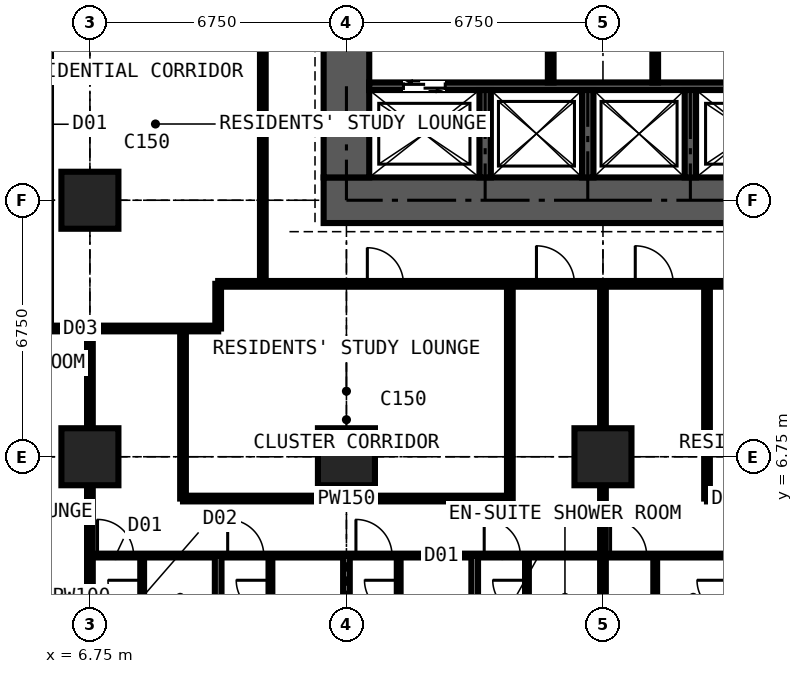
"""IFC4 building model, lengths in metres.
Left out: names, types, materials, properties, quantities, classifications, styles, units other than length and angle.
Written with IfcOpenShell. Run it as: python <this file> out.ifc"""

import sys

from ifc_helpers import new_model, si_unit, direction, frame, frame_2d, origin, origin_2d, place, context, subcontext, project, spatial, rectangle, extrude, element, fill, save


model = new_model("IFC4")
c1 = context("Model", 3, precision=1e-05, world=origin(), true_north=direction((0.0, 1.0)))
c2 = subcontext(c1, "Body", "Model", "MODEL_VIEW")
j1 = project(units=[si_unit("LENGTHUNIT", "METRE"), si_unit("PLANEANGLEUNIT", "RADIAN")], contexts=[c1])
p1 = place(None, origin())
s1 = spatial("IfcSite", under=j1, at=p1, CompositionType="ELEMENT")
p2 = place(p1, origin())
s2 = spatial("IfcBuilding", under=s1, at=p2, CompositionType="ELEMENT")
p3 = place(p2, frame((0.0, 0.0, 116.1)))
s3 = spatial("IfcBuildingStorey", under=s2, at=p3, CompositionType="ELEMENT", Elevation=116.1)
for number, where, z_axis, x_axis in (
    (1, (6.75, 6.75, 0.0), (0.0, 0.0, 1.0), (1.0, 0.0, 0.0)),
    (2, (6.75, 13.5, 0.0), (0.0, 0.0, 1.0), (1.0, 0.0, 0.0)),
    (3, (13.5, 6.75, 0.0), (0.0, 0.0, 1.0), (1.0, 0.0, 0.0)),
    (4, (20.25, 6.75, 0.0), (0.0, 0.0, 1.0), (1.0, 0.0, 0.0)),
):
    element("IfcColumn", number, at=place(p3, frame(where, z_axis=z_axis, x_axis=x_axis)), inside=s3, PredefinedType="COLUMN", context=c2, shape_type="SweptSolid", body=[
        extrude(rectangle(XDim=1.5, YDim=1.5, at=origin_2d()), origin(), (0.0, 0.0, 1.0), 3.6),
    ])
p4 = place(p3, frame((12.9, 13.5, 0.0), z_axis=(0.0, 0.0, 1.0), x_axis=(1.0, 0.0, 0.0)))
e5 = element("IfcWall", 5, at=p4, inside=s3, PredefinedType="SHEAR", context=c2, shape_type="SweptSolid", body=[
    extrude(rectangle(XDim=14.7, YDim=1.2, at=frame_2d((7.35, 0.0))), origin(), (0.0, 0.0, 1.0), 3.6),
])
p5 = place(p3, frame((13.5, 26.4, 0.0), z_axis=(0.0, 0.0, 1.0), x_axis=(0.0, -1.0, 0.0)))
e6 = element("IfcWall", 6, at=p5, inside=s3, PredefinedType="SHEAR", context=c2, shape_type="SweptSolid", body=[
    extrude(rectangle(XDim=12.3, YDim=1.2, at=frame_2d((6.15, 0.0))), origin(), (0.0, 0.0, 1.0), 3.6),
])
p6 = place(p5, frame((7.45, 0.0, 0.0)))
e7 = element("IfcOpeningElement", 7, at=p6, cuts=e6, PredefinedType="OPENING", context=c2, shape_type="SweptSolid", body=[
    extrude(rectangle(XDim=1.2, YDim=2.2, at=frame_2d((0.6, 1.1))), frame((0.0, 0.61, 0.0), z_axis=(0.0, -1.0, 0.0), x_axis=(1.0, 0.0, 0.0)), (0.0, 0.0, 1.0), 1.22),
])
p7 = place(p3, frame((14.1, 16.5, 0.0), z_axis=(0.0, 0.0, 1.0), x_axis=(1.0, 0.0, 0.0)))
e8 = element("IfcWall", 8, at=p7, inside=s3, PredefinedType="SHEAR", context=c2, shape_type="SweptSolid", body=[
    extrude(rectangle(XDim=12.3, YDim=0.2, at=frame_2d((6.15, 0.0))), origin(), (0.0, 0.0, 1.0), 3.6),
])
p8 = place(p7, frame((0.9, 0.0, 0.0)))
e9 = element("IfcOpeningElement", 9, at=p8, cuts=e8, PredefinedType="OPENING", context=c2, shape_type="SweptSolid", body=[
    extrude(rectangle(XDim=1.1, YDim=2.2, at=frame_2d((0.55, 1.1))), frame((0.0, 0.11, 0.0), z_axis=(0.0, -1.0, 0.0), x_axis=(1.0, 0.0, 0.0)), (0.0, 0.0, 1.0), 0.22),
])
p9 = place(p7, frame((9.5, 0.0, 0.0)))
e10 = element("IfcOpeningElement", 10, at=p9, cuts=e8, PredefinedType="OPENING", context=c2, shape_type="SweptSolid", body=[
    extrude(rectangle(XDim=1.1, YDim=2.2, at=frame_2d((0.55, 1.1))), frame((0.0, 0.11, 0.0), z_axis=(0.0, -1.0, 0.0), x_axis=(1.0, 0.0, 0.0)), (0.0, 0.0, 1.0), 0.22),
])
for number, where, z_axis, x_axis in (
    (11, (17.15, 14.1, 0.0), (0.0, 0.0, 1.0), (0.0, 1.0, 0.0)),
    (12, (19.85, 14.1, 0.0), (0.0, 0.0, 1.0), (0.0, 1.0, 0.0)),
    (13, (22.55, 14.1, 0.0), (0.0, 0.0, 1.0), (0.0, 1.0, 0.0)),
):
    element("IfcWall", number, at=place(p3, frame(where, z_axis=z_axis, x_axis=x_axis)), inside=s3, PredefinedType="SHEAR", context=c2, shape_type="SweptSolid", body=[
        extrude(rectangle(XDim=2.3, YDim=0.3, at=frame_2d((1.15, 0.0))), origin(), (0.0, 0.0, 1.0), 3.6),
    ])
p10 = place(p3, frame((18.875, 16.6, 0.0), z_axis=(0.0, 0.0, 1.0), x_axis=(0.0, 1.0, 0.0)))
e14 = element("IfcWall", 14, at=p10, inside=s3, PredefinedType="PARTITIONING", context=c2, shape_type="SweptSolid", body=[
    extrude(rectangle(XDim=3.5, YDim=0.15, at=frame_2d((1.75, 0.0))), origin(), (0.0, 0.0, 1.0), 3.375),
])
p11 = place(p10, frame((1.15, 0.0, 0.0)))
e15 = element("IfcOpeningElement", 15, at=p11, cuts=e14, PredefinedType="OPENING", context=c2, shape_type="SweptSolid", body=[
    extrude(rectangle(XDim=1.2, YDim=2.2, at=frame_2d((0.6, 1.1))), frame((0.0, 0.085, 0.0), z_axis=(0.0, -1.0, 0.0), x_axis=(1.0, 0.0, 0.0)), (0.0, 0.0, 1.0), 0.17),
])
p12 = place(p3, frame((21.625, 16.6, 0.0), z_axis=(0.0, 0.0, 1.0), x_axis=(0.0, 1.0, 0.0)))
e16 = element("IfcWall", 16, at=p12, inside=s3, PredefinedType="PARTITIONING", context=c2, shape_type="SweptSolid", body=[
    extrude(rectangle(XDim=3.5, YDim=0.15, at=frame_2d((1.75, 0.0))), origin(), (0.0, 0.0, 1.0), 3.375),
])
p13 = place(p12, frame((1.15, 0.0, 0.0)))
e17 = element("IfcOpeningElement", 17, at=p13, cuts=e16, PredefinedType="OPENING", context=c2, shape_type="SweptSolid", body=[
    extrude(rectangle(XDim=1.2, YDim=2.2, at=frame_2d((0.6, 1.1))), frame((0.0, 0.085, 0.0), z_axis=(0.0, -1.0, 0.0), x_axis=(1.0, 0.0, 0.0)), (0.0, 0.0, 1.0), 0.17),
])
p14 = place(p3, frame((-0.734, 10.125, 0.0), z_axis=(0.0, 0.0, 1.0), x_axis=(1.0, 0.0, 0.0)))
e18 = element("IfcWall", 18, at=p14, inside=s3, PredefinedType="PARTITIONING", context=c2, shape_type="SweptSolid", body=[
    extrude(rectangle(XDim=10.859, YDim=0.15, at=frame_2d((5.429, 0.0))), origin(), (0.0, 0.0, 1.0), 3.375),
])
p15 = place(p14, frame((5.134, 0.0, 0.0)))
e19 = element("IfcOpeningElement", 19, at=p15, cuts=e18, PredefinedType="OPENING", context=c2, shape_type="SweptSolid", body=[
    extrude(rectangle(XDim=1.0, YDim=2.2, at=frame_2d((0.5, 1.1))), frame((0.0, 0.085, 0.0), z_axis=(0.0, -1.0, 0.0), x_axis=(1.0, 0.0, 0.0)), (0.0, 0.0, 1.0), 0.17),
])
p16 = place(p3, frame((6.75, -0.734, 0.0), z_axis=(0.0, 0.0, 1.0), x_axis=(0.0, 1.0, 0.0)))
e20 = element("IfcWall", 20, at=p16, inside=s3, PredefinedType="PARTITIONING", context=c2, shape_type="SweptSolid", body=[
    extrude(rectangle(XDim=10.859, YDim=0.15, at=frame_2d((5.429, 0.0))), origin(), (0.0, 0.0, 1.0), 2.877),
])
p17 = place(p3, frame((6.75, 4.15, 0.0), z_axis=(0.0, 0.0, 1.0), x_axis=(1.0, 0.0, 0.0)))
e21 = element("IfcWall", 21, at=p17, inside=s3, PredefinedType="PARTITIONING", context=c2, shape_type="SweptSolid", body=[
    extrude(rectangle(XDim=23.625, YDim=0.1, at=frame_2d((11.812, 0.0))), origin(), (0.0, 0.0, 1.0), 3.375),
])
p18 = place(p17, frame((0.2, 0.0, 0.0)))
e22 = element("IfcOpeningElement", 22, at=p18, cuts=e21, PredefinedType="OPENING", context=c2, shape_type="SweptSolid", body=[
    extrude(rectangle(XDim=0.95, YDim=2.2, at=frame_2d((0.475, 1.1))), frame((0.0, 0.06, 0.0), z_axis=(0.0, -1.0, 0.0), x_axis=(1.0, 0.0, 0.0)), (0.0, 0.0, 1.0), 0.12),
])
p19 = place(p17, frame((3.625, 0.0, 0.0)))
e23 = element("IfcOpeningElement", 23, at=p19, cuts=e21, PredefinedType="OPENING", context=c2, shape_type="SweptSolid", body=[
    extrude(rectangle(XDim=0.95, YDim=2.2, at=frame_2d((0.475, 1.1))), frame((0.0, 0.06, 0.0), z_axis=(0.0, -1.0, 0.0), x_axis=(1.0, 0.0, 0.0)), (0.0, 0.0, 1.0), 0.12),
])
p20 = place(p17, frame((7.0, 0.0, 0.0)))
e24 = element("IfcOpeningElement", 24, at=p20, cuts=e21, PredefinedType="OPENING", context=c2, shape_type="SweptSolid", body=[
    extrude(rectangle(XDim=0.95, YDim=2.2, at=frame_2d((0.475, 1.1))), frame((0.0, 0.06, 0.0), z_axis=(0.0, -1.0, 0.0), x_axis=(1.0, 0.0, 0.0)), (0.0, 0.0, 1.0), 0.12),
])
p21 = place(p17, frame((10.375, 0.0, 0.0)))
e25 = element("IfcOpeningElement", 25, at=p21, cuts=e21, PredefinedType="OPENING", context=c2, shape_type="SweptSolid", body=[
    extrude(rectangle(XDim=0.95, YDim=2.2, at=frame_2d((0.475, 1.1))), frame((0.0, 0.06, 0.0), z_axis=(0.0, -1.0, 0.0), x_axis=(1.0, 0.0, 0.0)), (0.0, 0.0, 1.0), 0.12),
])
p22 = place(p17, frame((18.475, 0.0, 0.0)))
e26 = element("IfcOpeningElement", 26, at=p22, cuts=e21, PredefinedType="OPENING", context=c2, shape_type="SweptSolid", body=[
    extrude(rectangle(XDim=0.95, YDim=2.2, at=frame_2d((0.475, 1.1))), frame((0.0, 0.06, 0.0), z_axis=(0.0, -1.0, 0.0), x_axis=(1.0, 0.0, 0.0)), (0.0, 0.0, 1.0), 0.12),
])
p23 = place(p17, frame((13.7, 0.0, 0.0)))
e27 = element("IfcOpeningElement", 27, at=p23, cuts=e21, PredefinedType="OPENING", context=c2, shape_type="SweptSolid", body=[
    extrude(rectangle(XDim=0.95, YDim=2.2, at=frame_2d((0.475, 1.1))), frame((0.0, 0.06, 0.0), z_axis=(0.0, -1.0, 0.0), x_axis=(1.0, 0.0, 0.0)), (0.0, 0.0, 1.0), 0.12),
])
p24 = place(p3, frame((8.125, 1.95, 0.0), z_axis=(0.0, 0.0, 1.0), x_axis=(0.0, 1.0, 0.0)))
e28 = element("IfcWall", 28, at=p24, inside=s3, PredefinedType="PARTITIONING", context=c2, shape_type="SweptSolid", body=[
    extrude(rectangle(XDim=2.2, YDim=0.1, at=frame_2d((1.1, 0.0))), origin(), (0.0, 0.0, 1.0), 3.375),
])
p25 = place(p24, frame((0.65, 0.0, 0.0)))
e29 = element("IfcOpeningElement", 29, at=p25, cuts=e28, PredefinedType="OPENING", context=c2, shape_type="SweptSolid", body=[
    extrude(rectangle(XDim=0.9, YDim=2.2, at=frame_2d((0.45, 1.1))), frame((0.0, 0.06, 0.0), z_axis=(0.0, -1.0, 0.0), x_axis=(1.0, 0.0, 0.0)), (0.0, 0.0, 1.0), 0.12),
])
p26 = place(p3, frame((9.2, 5.65, 0.0), z_axis=(0.0, 0.0, 1.0), x_axis=(0.0, 1.0, 0.0)))
e30 = element("IfcWall", 30, at=p26, inside=s3, PredefinedType="PARTITIONING", context=c2, shape_type="SweptSolid", body=[
    extrude(rectangle(XDim=4.475, YDim=0.15, at=frame_2d((2.238, 0.0))), origin(), (0.0, 0.0, 1.0), 3.375),
])
p27 = place(p3, frame((9.2, 5.65, 0.0), z_axis=(0.0, 0.0, 1.0), x_axis=(1.0, 0.0, 0.0)))
e31 = element("IfcWall", 31, at=p27, inside=s3, PredefinedType="PARTITIONING", context=c2, shape_type="SweptSolid", body=[
    extrude(rectangle(XDim=8.6, YDim=0.15, at=frame_2d((4.3, 0.0))), origin(), (0.0, 0.0, 1.0), 3.375),
])
p28 = place(p3, frame((10.125, -0.734, 0.0), z_axis=(0.0, 0.0, 1.0), x_axis=(0.0, 1.0, 0.0)))
e32 = element("IfcWall", 32, at=p28, inside=s3, PredefinedType="PARTITIONING", context=c2, shape_type="SweptSolid", body=[
    extrude(rectangle(XDim=4.884, YDim=0.175, at=frame_2d((2.442, 0.0))), origin(), (0.0, 0.0, 1.0), 3.375),
])
p29 = place(p3, frame((10.125, 10.125, 0.0), z_axis=(0.0, 0.0, 1.0), x_axis=(0.0, 1.0, 0.0)))
e33 = element("IfcWall", 33, at=p29, inside=s3, PredefinedType="PARTITIONING", context=c2, shape_type="SweptSolid", body=[
    extrude(rectangle(XDim=1.175, YDim=0.15, at=frame_2d((0.587, 0.0))), origin(), (0.0, 0.0, 1.0), 3.375),
])
p30 = place(p3, frame((10.125, 11.3, 0.0), z_axis=(0.0, 0.0, 1.0), x_axis=(1.0, 0.0, 0.0)))
e34 = element("IfcWall", 34, at=p30, inside=s3, PredefinedType="PARTITIONING", context=c2, shape_type="SweptSolid", body=[
    extrude(rectangle(XDim=20.675, YDim=0.15, at=frame_2d((10.337, 0.0))), origin(), (0.0, 0.0, 1.0), 3.375),
])
p31 = place(p30, frame((8.375, 0.0, 0.0)))
e35 = element("IfcOpeningElement", 35, at=p31, cuts=e34, PredefinedType="OPENING", context=c2, shape_type="SweptSolid", body=[
    extrude(rectangle(XDim=1.0, YDim=2.2, at=frame_2d((0.5, 1.1))), frame((0.0, 0.085, 0.0), z_axis=(0.0, -1.0, 0.0), x_axis=(1.0, 0.0, 0.0)), (0.0, 0.0, 1.0), 0.17),
])
p32 = place(p30, frame((10.975, 0.0, 0.0)))
e36 = element("IfcOpeningElement", 36, at=p32, cuts=e34, PredefinedType="OPENING", context=c2, shape_type="SweptSolid", body=[
    extrude(rectangle(XDim=1.0, YDim=2.2, at=frame_2d((0.5, 1.1))), frame((0.0, 0.085, 0.0), z_axis=(0.0, -1.0, 0.0), x_axis=(1.0, 0.0, 0.0)), (0.0, 0.0, 1.0), 0.17),
])
p33 = place(p30, frame((3.925, 0.0, 0.0)))
e37 = element("IfcOpeningElement", 37, at=p33, cuts=e34, PredefinedType="OPENING", context=c2, shape_type="SweptSolid", body=[
    extrude(rectangle(XDim=0.95, YDim=2.2, at=frame_2d((0.475, 1.1))), frame((0.0, 0.085, 0.0), z_axis=(0.0, -1.0, 0.0), x_axis=(1.0, 0.0, 0.0)), (0.0, 0.0, 1.0), 0.17),
])
p34 = place(p3, frame((11.3, 11.3, 0.0), z_axis=(0.0, 0.0, 1.0), x_axis=(0.0, 1.0, 0.0)))
e38 = element("IfcWall", 38, at=p34, inside=s3, PredefinedType="PARTITIONING", context=c2, shape_type="SweptSolid", body=[
    extrude(rectangle(XDim=19.3, YDim=0.15, at=frame_2d((9.65, 0.0))), origin(), (0.0, 0.0, 1.0), 3.375),
])
p35 = place(p34, frame((13.525, 0.0, 0.0)))
e39 = element("IfcOpeningElement", 39, at=p35, cuts=e38, PredefinedType="OPENING", context=c2, shape_type="SweptSolid", body=[
    extrude(rectangle(XDim=1.0, YDim=2.2, at=frame_2d((0.5, 1.1))), frame((0.0, 0.085, 0.0), z_axis=(0.0, -1.0, 0.0), x_axis=(1.0, 0.0, 0.0)), (0.0, 0.0, 1.0), 0.17),
])
p36 = place(p34, frame((10.438, 0.0, 0.0)))
e40 = element("IfcOpeningElement", 40, at=p36, cuts=e38, PredefinedType="OPENING", context=c2, shape_type="SweptSolid", body=[
    extrude(rectangle(XDim=1.0, YDim=2.2, at=frame_2d((0.5, 1.1))), frame((0.0, 0.085, 0.0), z_axis=(0.0, -1.0, 0.0), x_axis=(1.0, 0.0, 0.0)), (0.0, 0.0, 1.0), 0.17),
])
p37 = place(p3, frame((11.5, 1.95, 0.0), z_axis=(0.0, 0.0, 1.0), x_axis=(0.0, 1.0, 0.0)))
e41 = element("IfcWall", 41, at=p37, inside=s3, PredefinedType="PARTITIONING", context=c2, shape_type="SweptSolid", body=[
    extrude(rectangle(XDim=2.2, YDim=0.1, at=frame_2d((1.1, 0.0))), origin(), (0.0, 0.0, 1.0), 3.375),
])
p38 = place(p37, frame((0.65, 0.0, 0.0)))
e42 = element("IfcOpeningElement", 42, at=p38, cuts=e41, PredefinedType="OPENING", context=c2, shape_type="SweptSolid", body=[
    extrude(rectangle(XDim=0.9, YDim=2.2, at=frame_2d((0.45, 1.1))), frame((0.0, 0.06, 0.0), z_axis=(0.0, -1.0, 0.0), x_axis=(1.0, 0.0, 0.0)), (0.0, 0.0, 1.0), 0.12),
])
p39 = place(p3, frame((13.5, -0.734, 0.0), z_axis=(0.0, 0.0, 1.0), x_axis=(0.0, 1.0, 0.0)))
e43 = element("IfcWall", 43, at=p39, inside=s3, PredefinedType="PARTITIONING", context=c2, shape_type="SweptSolid", body=[
    extrude(rectangle(XDim=4.884, YDim=0.175, at=frame_2d((2.442, 0.0))), origin(), (0.0, 0.0, 1.0), 2.877),
])
p40 = place(p3, frame((14.875, 1.95, 0.0), z_axis=(0.0, 0.0, 1.0), x_axis=(0.0, 1.0, 0.0)))
e44 = element("IfcWall", 44, at=p40, inside=s3, PredefinedType="PARTITIONING", context=c2, shape_type="SweptSolid", body=[
    extrude(rectangle(XDim=2.2, YDim=0.1, at=frame_2d((1.1, 0.0))), origin(), (0.0, 0.0, 1.0), 3.375),
])
p41 = place(p40, frame((0.65, 0.0, 0.0)))
e45 = element("IfcOpeningElement", 45, at=p41, cuts=e44, PredefinedType="OPENING", context=c2, shape_type="SweptSolid", body=[
    extrude(rectangle(XDim=0.9, YDim=2.2, at=frame_2d((0.45, 1.1))), frame((0.0, 0.06, 0.0), z_axis=(0.0, -1.0, 0.0), x_axis=(1.0, 0.0, 0.0)), (0.0, 0.0, 1.0), 0.12),
])
p42 = place(p3, frame((16.875, -0.734, 0.0), z_axis=(0.0, 0.0, 1.0), x_axis=(0.0, 1.0, 0.0)))
e46 = element("IfcWall", 46, at=p42, inside=s3, PredefinedType="PARTITIONING", context=c2, shape_type="SweptSolid", body=[
    extrude(rectangle(XDim=4.884, YDim=0.175, at=frame_2d((2.442, 0.0))), origin(), (0.0, 0.0, 1.0), 3.375),
])
p43 = place(p3, frame((17.8, 5.65, 0.0), z_axis=(0.0, 0.0, 1.0), x_axis=(0.0, 1.0, 0.0)))
e47 = element("IfcWall", 47, at=p43, inside=s3, PredefinedType="PARTITIONING", context=c2, shape_type="SweptSolid", body=[
    extrude(rectangle(XDim=5.65, YDim=0.15, at=frame_2d((2.825, 0.0))), origin(), (0.0, 0.0, 1.0), 3.375),
])
p44 = place(p3, frame((18.25, 1.95, 0.0), z_axis=(0.0, 0.0, 1.0), x_axis=(0.0, 1.0, 0.0)))
e48 = element("IfcWall", 48, at=p44, inside=s3, PredefinedType="PARTITIONING", context=c2, shape_type="SweptSolid", body=[
    extrude(rectangle(XDim=2.2, YDim=0.1, at=frame_2d((1.1, 0.0))), origin(), (0.0, 0.0, 1.0), 3.375),
])
p45 = place(p44, frame((0.65, 0.0, 0.0)))
e49 = element("IfcOpeningElement", 49, at=p45, cuts=e48, PredefinedType="OPENING", context=c2, shape_type="SweptSolid", body=[
    extrude(rectangle(XDim=0.9, YDim=2.2, at=frame_2d((0.45, 1.1))), frame((0.0, 0.06, 0.0), z_axis=(0.0, -1.0, 0.0), x_axis=(1.0, 0.0, 0.0)), (0.0, 0.0, 1.0), 0.12),
])
p46 = place(p3, frame((20.25, -0.734, 0.0), z_axis=(0.0, 0.0, 1.0), x_axis=(0.0, 1.0, 0.0)))
e50 = element("IfcWall", 50, at=p46, inside=s3, PredefinedType="PARTITIONING", context=c2, shape_type="SweptSolid", body=[
    extrude(rectangle(XDim=12.034, YDim=0.15, at=frame_2d((6.017, 0.0))), origin(), (0.0, 0.0, 1.0), 2.61),
])
p47 = place(p3, frame((21.625, 1.95, 0.0), z_axis=(0.0, 0.0, 1.0), x_axis=(0.0, 1.0, 0.0)))
e51 = element("IfcWall", 51, at=p47, inside=s3, PredefinedType="PARTITIONING", context=c2, shape_type="SweptSolid", body=[
    extrude(rectangle(XDim=2.2, YDim=0.1, at=frame_2d((1.1, 0.0))), origin(), (0.0, 0.0, 1.0), 3.375),
])
p48 = place(p3, frame((22.988, 5.65, 0.0), z_axis=(0.0, 0.0, 1.0), x_axis=(1.0, 0.0, 0.0)))
e52 = element("IfcWall", 52, at=p48, inside=s3, PredefinedType="PARTITIONING", context=c2, shape_type="SweptSolid", body=[
    extrude(rectangle(XDim=7.387, YDim=0.15, at=frame_2d((3.694, 0.0))), origin(), (0.0, 0.0, 1.0), 3.375),
])
p49 = place(p48, frame((2.3, 0.0, 0.0)))
e53 = element("IfcOpeningElement", 53, at=p49, cuts=e52, PredefinedType="OPENING", context=c2, shape_type="SweptSolid", body=[
    extrude(rectangle(XDim=0.95, YDim=2.2, at=frame_2d((0.475, 1.1))), frame((0.0, 0.085, 0.0), z_axis=(0.0, -1.0, 0.0), x_axis=(1.0, 0.0, 0.0)), (0.0, 0.0, 1.0), 0.17),
])
p50 = place(p3, frame((22.988, 5.65, 0.0), z_axis=(0.0, 0.0, 1.0), x_axis=(0.0, 1.0, 0.0)))
e54 = element("IfcWall", 54, at=p50, inside=s3, PredefinedType="PARTITIONING", context=c2, shape_type="SweptSolid", body=[
    extrude(rectangle(XDim=5.65, YDim=0.15, at=frame_2d((2.825, 0.0))), origin(), (0.0, 0.0, 1.0), 3.375),
])
p51 = place(p8, origin())
e55 = element("IfcDoor", 55, at=p51, inside=s3, OperationType="DOUBLE_DOOR_SLIDING", PredefinedType="DOOR", context=c2, shape_type="SweptSolid", body=[
    extrude(rectangle(XDim=1.1, YDim=2.2, at=frame_2d((0.55, 1.1))), frame((0.0, 0.025, 0.0), z_axis=(0.0, -1.0, 0.0), x_axis=(1.0, 0.0, 0.0)), (0.0, 0.0, 1.0), 0.05),
])
fill(e9, e55)
p52 = place(p18, origin())
e56 = element("IfcDoor", 56, at=p52, inside=s3, OperationType="SINGLE_SWING_LEFT", PredefinedType="DOOR", context=c2, shape_type="SweptSolid", body=[
    extrude(rectangle(XDim=0.95, YDim=2.2, at=frame_2d((0.475, 1.1))), frame((0.0, 0.025, 0.0), z_axis=(0.0, -1.0, 0.0), x_axis=(1.0, 0.0, 0.0)), (0.0, 0.0, 1.0), 0.05),
])
fill(e22, e56)
p53 = place(p25, origin())
e57 = element("IfcDoor", 57, at=p53, inside=s3, OperationType="SINGLE_SWING_RIGHT", PredefinedType="DOOR", context=c2, shape_type="SweptSolid", body=[
    extrude(rectangle(XDim=0.9, YDim=2.2, at=frame_2d((0.45, 1.1))), frame((0.0, 0.025, 0.0), z_axis=(0.0, -1.0, 0.0), x_axis=(1.0, 0.0, 0.0)), (0.0, 0.0, 1.0), 0.05),
])
fill(e29, e57)
p54 = place(p19, origin())
e58 = element("IfcDoor", 58, at=p54, inside=s3, OperationType="SINGLE_SWING_LEFT", PredefinedType="DOOR", context=c2, shape_type="SweptSolid", body=[
    extrude(rectangle(XDim=0.95, YDim=2.2, at=frame_2d((0.475, 1.1))), frame((0.0, 0.025, 0.0), z_axis=(0.0, -1.0, 0.0), x_axis=(1.0, 0.0, 0.0)), (0.0, 0.0, 1.0), 0.05),
])
fill(e23, e58)
p55 = place(p38, origin())
e59 = element("IfcDoor", 59, at=p55, inside=s3, OperationType="SINGLE_SWING_RIGHT", PredefinedType="DOOR", context=c2, shape_type="SweptSolid", body=[
    extrude(rectangle(XDim=0.9, YDim=2.2, at=frame_2d((0.45, 1.1))), frame((0.0, 0.025, 0.0), z_axis=(0.0, -1.0, 0.0), x_axis=(1.0, 0.0, 0.0)), (0.0, 0.0, 1.0), 0.05),
])
fill(e42, e59)
p56 = place(p20, origin())
e60 = element("IfcDoor", 60, at=p56, inside=s3, OperationType="SINGLE_SWING_LEFT", PredefinedType="DOOR", context=c2, shape_type="SweptSolid", body=[
    extrude(rectangle(XDim=0.95, YDim=2.2, at=frame_2d((0.475, 1.1))), frame((0.0, 0.025, 0.0), z_axis=(0.0, -1.0, 0.0), x_axis=(1.0, 0.0, 0.0)), (0.0, 0.0, 1.0), 0.05),
])
fill(e24, e60)
p57 = place(p41, origin())
e61 = element("IfcDoor", 61, at=p57, inside=s3, OperationType="SINGLE_SWING_RIGHT", PredefinedType="DOOR", context=c2, shape_type="SweptSolid", body=[
    extrude(rectangle(XDim=0.9, YDim=2.2, at=frame_2d((0.45, 1.1))), frame((0.0, 0.025, 0.0), z_axis=(0.0, -1.0, 0.0), x_axis=(1.0, 0.0, 0.0)), (0.0, 0.0, 1.0), 0.05),
])
fill(e45, e61)
p58 = place(p21, origin())
e62 = element("IfcDoor", 62, at=p58, inside=s3, OperationType="SINGLE_SWING_LEFT", PredefinedType="DOOR", context=c2, shape_type="SweptSolid", body=[
    extrude(rectangle(XDim=0.95, YDim=2.2, at=frame_2d((0.475, 1.1))), frame((0.0, 0.025, 0.0), z_axis=(0.0, -1.0, 0.0), x_axis=(1.0, 0.0, 0.0)), (0.0, 0.0, 1.0), 0.05),
])
fill(e25, e62)
p59 = place(p45, origin())
e63 = element("IfcDoor", 63, at=p59, inside=s3, OperationType="SINGLE_SWING_RIGHT", PredefinedType="DOOR", context=c2, shape_type="SweptSolid", body=[
    extrude(rectangle(XDim=0.9, YDim=2.2, at=frame_2d((0.45, 1.1))), frame((0.0, 0.025, 0.0), z_axis=(0.0, -1.0, 0.0), x_axis=(1.0, 0.0, 0.0)), (0.0, 0.0, 1.0), 0.05),
])
fill(e49, e63)
p60 = place(p31, origin())
e64 = element("IfcDoor", 64, at=p60, inside=s3, OperationType="SINGLE_SWING_LEFT", PredefinedType="DOOR", context=c2, shape_type="SweptSolid", body=[
    extrude(rectangle(XDim=1.0, YDim=2.2, at=frame_2d((0.5, 1.1))), frame((0.0, 0.025, 0.0), z_axis=(0.0, -1.0, 0.0), x_axis=(1.0, 0.0, 0.0)), (0.0, 0.0, 1.0), 0.05),
])
fill(e35, e64)
p61 = place(p23, origin())
e65 = element("IfcDoor", 65, at=p61, inside=s3, OperationType="SINGLE_SWING_LEFT", PredefinedType="DOOR", context=c2, shape_type="SweptSolid", body=[
    extrude(rectangle(XDim=0.95, YDim=2.2, at=frame_2d((0.475, 1.1))), frame((0.0, 0.025, 0.0), z_axis=(0.0, -1.0, 0.0), x_axis=(1.0, 0.0, 0.0)), (0.0, 0.0, 1.0), 0.05),
])
fill(e27, e65)
p62 = place(p32, origin())
e66 = element("IfcDoor", 66, at=p62, inside=s3, OperationType="SINGLE_SWING_LEFT", PredefinedType="DOOR", context=c2, shape_type="SweptSolid", body=[
    extrude(rectangle(XDim=1.0, YDim=2.2, at=frame_2d((0.5, 1.1))), frame((0.0, 0.025, 0.0), z_axis=(0.0, -1.0, 0.0), x_axis=(1.0, 0.0, 0.0)), (0.0, 0.0, 1.0), 0.05),
])
fill(e36, e66)
p63 = place(p33, origin())
e67 = element("IfcDoor", 67, at=p63, inside=s3, OperationType="SINGLE_SWING_LEFT", PredefinedType="DOOR", context=c2, shape_type="SweptSolid", body=[
    extrude(rectangle(XDim=0.95, YDim=2.2, at=frame_2d((0.475, 1.1))), frame((0.0, 0.025, 0.0), z_axis=(0.0, -1.0, 0.0), x_axis=(1.0, 0.0, 0.0)), (0.0, 0.0, 1.0), 0.05),
])
fill(e37, e67)
save(model, sys.argv[1])
